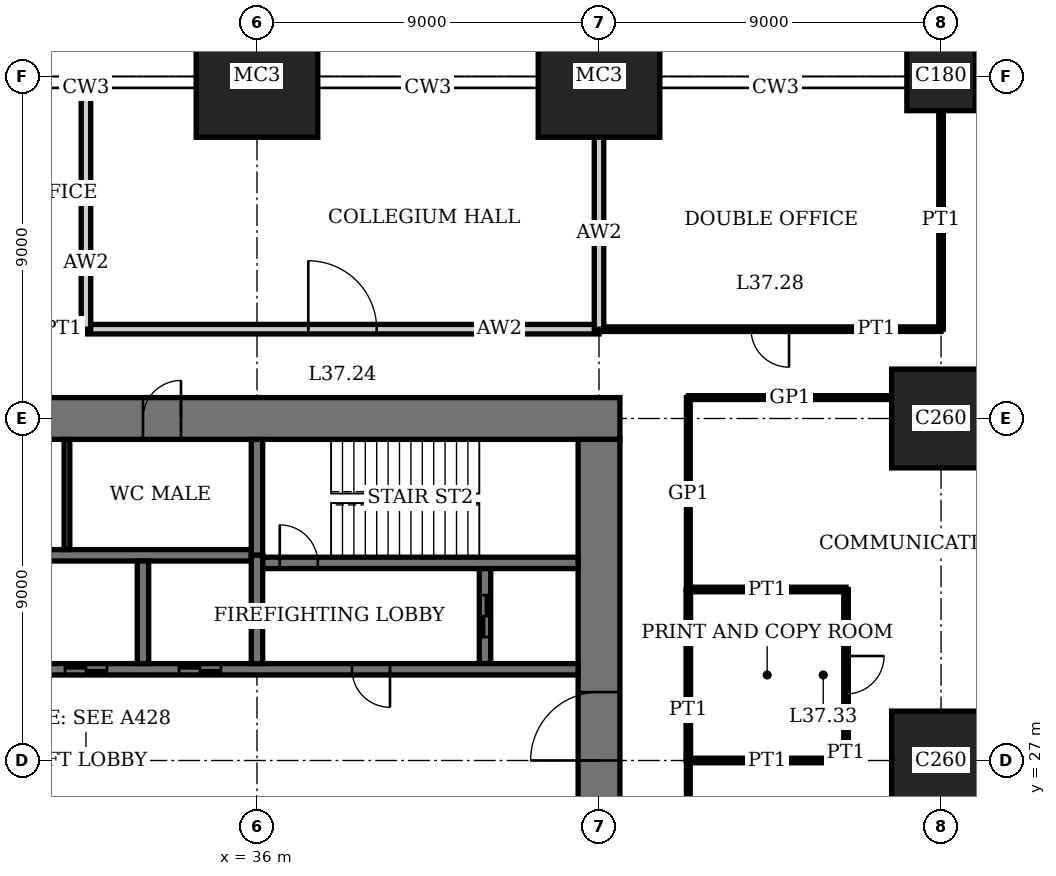
"""IFC4 building model, lengths in metres.
Left out: names, types, materials, properties, quantities, classifications, styles, units other than length and angle.
Written with IfcOpenShell. Run it as: python <this file> out.ifc"""

import sys

from ifc_helpers import new_model, si_unit, direction, frame, frame_2d, origin, origin_2d, place, context, subcontext, project, spatial, rectangle, extrude, element, fill, save


model = new_model("IFC4")
c1 = context("Model", 3, precision=1e-05, world=origin(), true_north=direction((0.0, 1.0)))
c2 = subcontext(c1, "Body", "Model", "MODEL_VIEW")
j1 = project(units=[si_unit("LENGTHUNIT", "METRE"), si_unit("PLANEANGLEUNIT", "RADIAN")], contexts=[c1])
p1 = place(None, origin())
s1 = spatial("IfcSite", under=j1, at=p1, CompositionType="ELEMENT")
p2 = place(p1, origin())
s2 = spatial("IfcBuilding", under=s1, at=p2, CompositionType="ELEMENT")
p3 = place(p2, frame((0.0, 0.0, 153.0)))
s3 = spatial("IfcBuildingStorey", under=s2, at=p3, CompositionType="ELEMENT", Elevation=153.0)
for number, where, z_axis, x_axis in (
    (1, (36.0, 45.0, 0.0), (0.0, 0.0, 1.0), (1.0, 0.0, 0.0)),
    (2, (45.0, 45.0, 0.0), (0.0, 0.0, 1.0), (1.0, 0.0, 0.0)),
):
    element("IfcColumn", number, at=place(p3, frame(where, z_axis=z_axis, x_axis=x_axis)), inside=s3, PredefinedType="COLUMN", context=c2, shape_type="SweptSolid", body=[
        extrude(rectangle(XDim=3.2, YDim=3.2, at=origin_2d()), origin(), (0.0, 0.0, 1.0), 4.2),
    ])
for number, where, z_axis, x_axis in (
    (3, (54.0, 27.0, 0.0), (0.0, 0.0, 1.0), (1.0, 0.0, 0.0)),
    (4, (54.0, 36.0, 0.0), (0.0, 0.0, 1.0), (1.0, 0.0, 0.0)),
):
    element("IfcColumn", number, at=place(p3, frame(where, z_axis=z_axis, x_axis=x_axis)), inside=s3, PredefinedType="COLUMN", context=c2, shape_type="SweptSolid", body=[
        extrude(rectangle(XDim=2.6, YDim=2.6, at=origin_2d()), origin(), (0.0, 0.0, 1.0), 4.2),
    ])
p4 = place(p3, frame((54.0, 45.0, 0.0), z_axis=(0.0, 0.0, 1.0), x_axis=(1.0, 0.0, 0.0)))
e5 = element("IfcColumn", 5, at=p4, inside=s3, PredefinedType="COLUMN", context=c2, shape_type="SweptSolid", body=[
    extrude(rectangle(XDim=1.8, YDim=1.8, at=origin_2d()), origin(), (0.0, 0.0, 1.0), 4.2),
])
p5 = place(p3, frame((45.55, 36.0, 0.0), z_axis=(0.0, 0.0, 1.0), x_axis=(-1.0, 0.0, 0.0)))
e6 = element("IfcWall", 6, at=p5, inside=s3, PredefinedType="SHEAR", context=c2, shape_type="SweptSolid", body=[
    extrude(rectangle(XDim=28.1, YDim=1.1, at=frame_2d((14.05, 0.0))), origin(), (0.0, 0.0, 1.0), 4.2),
])
p6 = place(p5, frame((11.55, 0.0, 0.0)))
e7 = element("IfcOpeningElement", 7, at=p6, cuts=e6, PredefinedType="OPENING", context=c2, shape_type="SweptSolid", body=[
    extrude(rectangle(XDim=1.0, YDim=2.4, at=frame_2d((0.5, 1.2))), frame((0.0, 0.56, 0.0), z_axis=(0.0, -1.0, 0.0), x_axis=(1.0, 0.0, 0.0)), (0.0, 0.0, 1.0), 1.12),
])
p7 = place(p5, frame((16.55, 0.0, 0.0)))
e8 = element("IfcOpeningElement", 8, at=p7, cuts=e6, PredefinedType="OPENING", context=c2, shape_type="SweptSolid", body=[
    extrude(rectangle(XDim=1.0, YDim=2.4, at=frame_2d((0.5, 1.2))), frame((0.0, 0.56, 0.0), z_axis=(0.0, -1.0, 0.0), x_axis=(1.0, 0.0, 0.0)), (0.0, 0.0, 1.0), 1.12),
])
p8 = place(p5, frame((20.0, 0.0, 0.0)))
e9 = element("IfcOpeningElement", 9, at=p8, cuts=e6, PredefinedType="OPENING", context=c2, shape_type="SweptSolid", body=[
    extrude(rectangle(XDim=1.1, YDim=2.4, at=frame_2d((0.55, 1.2))), frame((0.0, 0.56, 0.0), z_axis=(0.0, -1.0, 0.0), x_axis=(1.0, 0.0, 0.0)), (0.0, 0.0, 1.0), 1.12),
])
p9 = place(p5, frame((24.05, 0.0, 0.0)))
e10 = element("IfcOpeningElement", 10, at=p9, cuts=e6, PredefinedType="OPENING", context=c2, shape_type="SweptSolid", body=[
    extrude(rectangle(XDim=1.0, YDim=2.4, at=frame_2d((0.5, 1.2))), frame((0.0, 0.56, 0.0), z_axis=(0.0, -1.0, 0.0), x_axis=(1.0, 0.0, 0.0)), (0.0, 0.0, 1.0), 1.12),
])
p10 = place(p3, frame((45.0, 18.55, 0.0), z_axis=(0.0, 0.0, 1.0), x_axis=(0.0, 1.0, 0.0)))
e11 = element("IfcWall", 11, at=p10, inside=s3, PredefinedType="SHEAR", context=c2, shape_type="SweptSolid", body=[
    extrude(rectangle(XDim=16.9, YDim=1.1, at=frame_2d((8.45, 0.0))), origin(), (0.0, 0.0, 1.0), 4.2),
])
p11 = place(p10, frame((8.45, 0.0, 0.0)))
e12 = element("IfcOpeningElement", 12, at=p11, cuts=e11, PredefinedType="OPENING", context=c2, shape_type="SweptSolid", body=[
    extrude(rectangle(XDim=1.8, YDim=2.4, at=frame_2d((0.9, 1.2))), frame((0.0, 0.56, 0.0), z_axis=(0.0, -1.0, 0.0), x_axis=(1.0, 0.0, 0.0)), (0.0, 0.0, 1.0), 1.12),
])
p12 = place(p3, frame((36.15, 32.2, 0.0), z_axis=(0.0, 0.0, 1.0), x_axis=(1.0, 0.0, 0.0)))
e13 = element("IfcWall", 13, at=p12, inside=s3, PredefinedType="SHEAR", context=c2, shape_type="SweptSolid", body=[
    extrude(rectangle(XDim=8.3, YDim=0.3, at=frame_2d((4.15, 0.0))), origin(), (0.0, 0.0, 1.0), 4.2),
])
p13 = place(p12, frame((0.45, 0.0, 0.0)))
e14 = element("IfcOpeningElement", 14, at=p13, cuts=e13, PredefinedType="OPENING", context=c2, shape_type="SweptSolid", body=[
    extrude(rectangle(XDim=1.0, YDim=2.4, at=frame_2d((0.5, 1.2))), frame((0.0, 0.16, 0.0), z_axis=(0.0, -1.0, 0.0), x_axis=(1.0, 0.0, 0.0)), (0.0, 0.0, 1.0), 0.32),
])
p14 = place(p3, frame((36.0, 32.4, 0.0), z_axis=(0.0, 0.0, 1.0), x_axis=(0.0, 1.0, 0.0)))
e15 = element("IfcWall", 15, at=p14, inside=s3, PredefinedType="SHEAR", context=c2, shape_type="SweptSolid", body=[
    extrude(rectangle(XDim=3.05, YDim=0.3, at=frame_2d((1.525, 0.0))), origin(), (0.0, 0.0, 1.0), 4.2),
])
p15 = place(p3, frame((42.0, 29.55, 0.0), z_axis=(0.0, 0.0, 1.0), x_axis=(0.0, 1.0, 0.0)))
e16 = element("IfcWall", 16, at=p15, inside=s3, PredefinedType="SHEAR", context=c2, shape_type="SweptSolid", body=[
    extrude(rectangle(XDim=2.5, YDim=0.3, at=frame_2d((1.25, 0.0))), origin(), (0.0, 0.0, 1.0), 4.2),
])
p16 = place(p15, frame((0.7, 0.0, 0.0)))
e17 = element("IfcOpeningElement", 17, at=p16, cuts=e16, PredefinedType="OPENING", context=c2, shape_type="SweptSolid", body=[
    extrude(rectangle(XDim=1.1, YDim=2.4, at=frame_2d((0.55, 1.2))), frame((0.0, 0.16, 0.0), z_axis=(0.0, -1.0, 0.0), x_axis=(1.0, 0.0, 0.0)), (0.0, 0.0, 1.0), 0.32),
])
p17 = place(p3, frame((18.55, 29.4, 0.0), z_axis=(0.0, 0.0, 1.0), x_axis=(1.0, 0.0, 0.0)))
e18 = element("IfcWall", 18, at=p17, inside=s3, PredefinedType="SHEAR", context=c2, shape_type="SweptSolid", body=[
    extrude(rectangle(XDim=25.9, YDim=0.3, at=frame_2d((12.95, 0.0))), origin(), (0.0, 0.0, 1.0), 4.2),
])
p18 = place(p17, frame((19.95, 0.0, 0.0)))
e19 = element("IfcOpeningElement", 19, at=p18, cuts=e18, PredefinedType="OPENING", context=c2, shape_type="SweptSolid", body=[
    extrude(rectangle(XDim=1.0, YDim=2.4, at=frame_2d((0.5, 1.2))), frame((0.0, 0.16, 0.0), z_axis=(0.0, -1.0, 0.0), x_axis=(1.0, 0.0, 0.0)), (0.0, 0.0, 1.0), 0.32),
])
p19 = place(p17, frame((0.5, 0.0, 0.0)))
e20 = element("IfcOpeningElement", 20, at=p19, cuts=e18, PredefinedType="OPENING", context=c2, shape_type="SweptSolid", body=[
    extrude(rectangle(XDim=0.9, YDim=2.1, at=frame_2d((0.45, 1.05))), frame((0.0, 0.16, 0.0), z_axis=(0.0, -1.0, 0.0), x_axis=(1.0, 0.0, 0.0)), (0.0, 0.0, 1.0), 0.32),
])
p20 = place(p17, frame((15.4, 0.0, 0.0)))
e21 = element("IfcOpeningElement", 21, at=p20, cuts=e18, PredefinedType="OPENING", context=c2, shape_type="SweptSolid", body=[
    extrude(rectangle(XDim=1.1, YDim=2.4, at=frame_2d((0.55, 1.2))), frame((0.0, 0.16, 0.0), z_axis=(0.0, -1.0, 0.0), x_axis=(1.0, 0.0, 0.0)), (0.0, 0.0, 1.0), 0.32),
])
p21 = place(p17, frame((12.4, 0.0, 0.0)))
e22 = element("IfcOpeningElement", 22, at=p21, cuts=e18, PredefinedType="OPENING", context=c2, shape_type="SweptSolid", body=[
    extrude(rectangle(XDim=1.1, YDim=2.4, at=frame_2d((0.55, 1.2))), frame((0.0, 0.16, 0.0), z_axis=(0.0, -1.0, 0.0), x_axis=(1.0, 0.0, 0.0)), (0.0, 0.0, 1.0), 0.32),
])
p22 = place(p17, frame((3.3, 0.0, 0.0)))
e23 = element("IfcOpeningElement", 23, at=p22, cuts=e18, PredefinedType="OPENING", context=c2, shape_type="SweptSolid", body=[
    extrude(rectangle(XDim=1.3, YDim=2.4, at=frame_2d((0.65, 1.2))), frame((0.0, 0.16, 0.0), z_axis=(0.0, -1.0, 0.0), x_axis=(1.0, 0.0, 0.0)), (0.0, 0.0, 1.0), 0.32),
])
p23 = place(p3, frame((18.55, 32.4, 0.0), z_axis=(0.0, 0.0, 1.0), x_axis=(1.0, 0.0, 0.0)))
e24 = element("IfcWall", 24, at=p23, inside=s3, PredefinedType="SHEAR", context=c2, shape_type="SweptSolid", body=[
    extrude(rectangle(XDim=17.3, YDim=0.3, at=frame_2d((8.65, 0.0))), origin(), (0.0, 0.0, 1.0), 4.2),
])
p24 = place(p3, frame((33.0, 29.55, 0.0), z_axis=(0.0, 0.0, 1.0), x_axis=(0.0, 1.0, 0.0)))
e25 = element("IfcWall", 25, at=p24, inside=s3, PredefinedType="SHEAR", context=c2, shape_type="SweptSolid", body=[
    extrude(rectangle(XDim=2.7, YDim=0.3, at=frame_2d((1.35, 0.0))), origin(), (0.0, 0.0, 1.0), 4.2),
])
p25 = place(p3, frame((36.0, 29.55, 0.0), z_axis=(0.0, 0.0, 1.0), x_axis=(0.0, 1.0, 0.0)))
e26 = element("IfcWall", 26, at=p25, inside=s3, PredefinedType="SHEAR", context=c2, shape_type="SweptSolid", body=[
    extrude(rectangle(XDim=2.85, YDim=0.3, at=frame_2d((1.425, 0.0))), origin(), (0.0, 0.0, 1.0), 4.2),
])
p26 = place(p3, frame((47.35, 27.0, 0.0), z_axis=(0.0, 0.0, 1.0), x_axis=(1.0, 0.0, 0.0)))
e27 = element("IfcWall", 27, at=p26, inside=s3, PredefinedType="PARTITIONING", context=c2, shape_type="SweptSolid", body=[
    extrude(rectangle(XDim=4.15, YDim=0.12, at=frame_2d((2.075, 0.0))), origin(), (0.0, 0.0, 1.0), 3.25),
])
p27 = place(p3, frame((47.35, 31.5, 0.0), z_axis=(0.0, 0.0, 1.0), x_axis=(1.0, 0.0, 0.0)))
e28 = element("IfcWall", 28, at=p27, inside=s3, PredefinedType="PARTITIONING", context=c2, shape_type="SweptSolid", body=[
    extrude(rectangle(XDim=4.15, YDim=0.12, at=frame_2d((2.075, 0.0))), origin(), (0.0, 0.0, 1.0), 3.15),
])
p28 = place(p3, frame((47.35, 36.55, 0.0), z_axis=(0.0, 0.0, 1.0), x_axis=(1.0, 0.0, 0.0)))
e29 = element("IfcWall", 29, at=p28, inside=s3, PredefinedType="PARTITIONING", context=c2, shape_type="SweptSolid", body=[
    extrude(rectangle(XDim=5.35, YDim=0.1, at=frame_2d((2.675, 0.0))), origin(), (0.0, 0.0, 1.0), 3.85),
])
p29 = place(p3, frame((31.5, 38.35, 0.0), z_axis=(0.0, 0.0, 1.0), x_axis=(1.0, 0.0, 0.0)))
e30 = element("IfcWall", 30, at=p29, inside=s3, PredefinedType="PARTITIONING", context=c2, shape_type="SweptSolid", body=[
    extrude(rectangle(XDim=13.5, YDim=0.25, at=frame_2d((6.75, 0.0))), origin(), (0.0, 0.0, 1.0), 3.85),
])
p30 = place(p29, frame((5.85, 0.0, 0.0)))
e31 = element("IfcOpeningElement", 31, at=p30, cuts=e30, PredefinedType="OPENING", context=c2, shape_type="SweptSolid", body=[
    extrude(rectangle(XDim=1.8, YDim=2.4, at=frame_2d((0.9, 1.2))), frame((0.0, 0.135, 0.0), z_axis=(0.0, -1.0, 0.0), x_axis=(1.0, 0.0, 0.0)), (0.0, 0.0, 1.0), 0.27),
])
p31 = place(p3, frame((27.0, 38.35, 0.0), z_axis=(0.0, 0.0, 1.0), x_axis=(1.0, 0.0, 0.0)))
e32 = element("IfcWall", 32, at=p31, inside=s3, PredefinedType="PARTITIONING", context=c2, shape_type="SweptSolid", body=[
    extrude(rectangle(XDim=4.5, YDim=0.12, at=frame_2d((2.25, 0.0))), origin(), (0.0, 0.0, 1.0), 3.85),
])
p32 = place(p31, frame((1.75, 0.0, 0.0)))
e33 = element("IfcOpeningElement", 33, at=p32, cuts=e32, PredefinedType="OPENING", context=c2, shape_type="SweptSolid", body=[
    extrude(rectangle(XDim=1.0, YDim=2.4, at=frame_2d((0.5, 1.2))), frame((0.0, 0.07, 0.0), z_axis=(0.0, -1.0, 0.0), x_axis=(1.0, 0.0, 0.0)), (0.0, 0.0, 1.0), 0.14),
])
p33 = place(p3, frame((45.0, 38.35, 0.0), z_axis=(0.0, 0.0, 1.0), x_axis=(1.0, 0.0, 0.0)))
e34 = element("IfcWall", 34, at=p33, inside=s3, PredefinedType="PARTITIONING", context=c2, shape_type="SweptSolid", body=[
    extrude(rectangle(XDim=9.0, YDim=0.12, at=frame_2d((4.5, 0.0))), origin(), (0.0, 0.0, 1.0), 3.85),
])
p34 = place(p33, frame((4.0, 0.0, 0.0)))
e35 = element("IfcOpeningElement", 35, at=p34, cuts=e34, PredefinedType="OPENING", context=c2, shape_type="SweptSolid", body=[
    extrude(rectangle(XDim=1.0, YDim=2.4, at=frame_2d((0.5, 1.2))), frame((0.0, 0.07, 0.0), z_axis=(0.0, -1.0, 0.0), x_axis=(1.0, 0.0, 0.0)), (0.0, 0.0, 1.0), 0.14),
])
p35 = place(p3, frame((31.5, 38.35, 0.0), z_axis=(0.0, 0.0, 1.0), x_axis=(0.0, 1.0, 0.0)))
e36 = element("IfcWall", 36, at=p35, inside=s3, PredefinedType="PARTITIONING", context=c2, shape_type="SweptSolid", body=[
    extrude(rectangle(XDim=6.34, YDim=0.25, at=frame_2d((3.17, 0.0))), origin(), (0.0, 0.0, 1.0), 3.85),
])
p36 = place(p3, frame((45.0, 38.35, 0.0), z_axis=(0.0, 0.0, 1.0), x_axis=(0.0, 1.0, 0.0)))
e37 = element("IfcWall", 37, at=p36, inside=s3, PredefinedType="PARTITIONING", context=c2, shape_type="SweptSolid", body=[
    extrude(rectangle(XDim=5.05, YDim=0.25, at=frame_2d((2.525, 0.0))), origin(), (0.0, 0.0, 1.0), 3.25),
])
p37 = place(p3, frame((47.35, 27.0, 0.0), z_axis=(0.0, 0.0, 1.0), x_axis=(0.0, 1.0, 0.0)))
e38 = element("IfcWall", 38, at=p37, inside=s3, PredefinedType="PARTITIONING", context=c2, shape_type="SweptSolid", body=[
    extrude(rectangle(XDim=4.5, YDim=0.12, at=frame_2d((2.25, 0.0))), origin(), (0.0, 0.0, 1.0), 3.85),
])
p38 = place(p3, frame((47.35, 15.65, 0.0), z_axis=(0.0, 0.0, 1.0), x_axis=(0.0, 1.0, 0.0)))
e39 = element("IfcWall", 39, at=p38, inside=s3, PredefinedType="PARTITIONING", context=c2, shape_type="SweptSolid", body=[
    extrude(rectangle(XDim=11.35, YDim=0.1, at=frame_2d((5.675, 0.0))), origin(), (0.0, 0.0, 1.0), 3.85),
])
p39 = place(p38, frame((5.175, 0.0, 0.0)))
e40 = element("IfcOpeningElement", 40, at=p39, cuts=e39, PredefinedType="OPENING", context=c2, shape_type="SweptSolid", body=[
    extrude(rectangle(XDim=1.0, YDim=2.4, at=frame_2d((0.5, 1.2))), frame((0.0, 0.06, 0.0), z_axis=(0.0, -1.0, 0.0), x_axis=(1.0, 0.0, 0.0)), (0.0, 0.0, 1.0), 0.12),
])
p40 = place(p3, frame((47.35, 31.5, 0.0), z_axis=(0.0, 0.0, 1.0), x_axis=(0.0, 1.0, 0.0)))
e41 = element("IfcWall", 41, at=p40, inside=s3, PredefinedType="PARTITIONING", context=c2, shape_type="SweptSolid", body=[
    extrude(rectangle(XDim=5.05, YDim=0.1, at=frame_2d((2.525, 0.0))), origin(), (0.0, 0.0, 1.0), 3.85),
])
p41 = place(p3, frame((51.5, 27.0, 0.0), z_axis=(0.0, 0.0, 1.0), x_axis=(0.0, 1.0, 0.0)))
e42 = element("IfcWall", 42, at=p41, inside=s3, PredefinedType="PARTITIONING", context=c2, shape_type="SweptSolid", body=[
    extrude(rectangle(XDim=4.5, YDim=0.12, at=frame_2d((2.25, 0.0))), origin(), (0.0, 0.0, 1.0), 3.85),
])
p42 = place(p41, frame((1.75, 0.0, 0.0)))
e43 = element("IfcOpeningElement", 43, at=p42, cuts=e42, PredefinedType="OPENING", context=c2, shape_type="SweptSolid", body=[
    extrude(rectangle(XDim=1.0, YDim=2.4, at=frame_2d((0.5, 1.2))), frame((0.0, 0.07, 0.0), z_axis=(0.0, -1.0, 0.0), x_axis=(1.0, 0.0, 0.0)), (0.0, 0.0, 1.0), 0.14),
])
p43 = place(p3, frame((54.0, 38.35, 0.0), z_axis=(0.0, 0.0, 1.0), x_axis=(0.0, 1.0, 0.0)))
e44 = element("IfcWall", 44, at=p43, inside=s3, PredefinedType="PARTITIONING", context=c2, shape_type="SweptSolid", body=[
    extrude(rectangle(XDim=5.75, YDim=0.12, at=frame_2d((2.875, 0.0))), origin(), (0.0, 0.0, 1.0), 3.05),
])
p44 = place(p3, frame((31.0, 32.55, 0.0), z_axis=(0.0, 0.0, 1.0), x_axis=(0.0, 1.0, 0.0)))
e45 = element("IfcWall", 45, at=p44, inside=s3, PredefinedType="PARTITIONING", context=c2, shape_type="SweptSolid", body=[
    extrude(rectangle(XDim=2.9, YDim=0.15, at=frame_2d((1.45, 0.0))), origin(), (0.0, 0.0, 1.0), 3.85),
])
p45 = place(p11, origin())
e46 = element("IfcDoor", 46, at=p45, inside=s3, OperationType="DOUBLE_DOOR_DOUBLE_SWING", PredefinedType="DOOR", context=c2, shape_type="SweptSolid", body=[
    extrude(rectangle(XDim=1.8, YDim=2.4, at=frame_2d((0.9, 1.2))), frame((0.0, 0.03, 0.0), z_axis=(0.0, -1.0, 0.0), x_axis=(1.0, 0.0, 0.0)), (0.0, 0.0, 1.0), 0.06),
    extrude(rectangle(XDim=0.04, YDim=2.4, at=frame_2d((0.02, 1.2))), frame((0.0, 0.55, 0.0), z_axis=(0.0, -1.0, 0.0), x_axis=(1.0, 0.0, 0.0)), (0.0, 0.0, 1.0), 1.1),
    extrude(rectangle(XDim=0.04, YDim=2.4, at=frame_2d((1.78, 1.2))), frame((0.0, 0.55, 0.0), z_axis=(0.0, -1.0, 0.0), x_axis=(1.0, 0.0, 0.0)), (0.0, 0.0, 1.0), 1.1),
    extrude(rectangle(XDim=1.8, YDim=0.04, at=frame_2d((0.9, 2.38))), frame((0.0, 0.55, 0.0), z_axis=(0.0, -1.0, 0.0), x_axis=(1.0, 0.0, 0.0)), (0.0, 0.0, 1.0), 1.1),
])
fill(e12, e46)
p46 = place(p6, origin())
e47 = element("IfcDoor", 47, at=p46, inside=s3, OperationType="SINGLE_SWING_LEFT", PredefinedType="DOOR", context=c2, shape_type="SweptSolid", body=[
    extrude(rectangle(XDim=1.0, YDim=2.4, at=frame_2d((0.5, 1.2))), frame((0.0, 0.025, 0.0), z_axis=(0.0, -1.0, 0.0), x_axis=(1.0, 0.0, 0.0)), (0.0, 0.0, 1.0), 0.05),
    extrude(rectangle(XDim=0.04, YDim=2.4, at=frame_2d((0.02, 1.2))), frame((0.0, 0.4, 0.0), z_axis=(0.0, -1.0, 0.0), x_axis=(1.0, 0.0, 0.0)), (0.0, 0.0, 1.0), 0.8),
    extrude(rectangle(XDim=0.04, YDim=2.4, at=frame_2d((0.98, 1.2))), frame((0.0, 0.4, 0.0), z_axis=(0.0, -1.0, 0.0), x_axis=(1.0, 0.0, 0.0)), (0.0, 0.0, 1.0), 0.8),
    extrude(rectangle(XDim=1.0, YDim=0.04, at=frame_2d((0.5, 2.38))), frame((0.0, 0.4, 0.0), z_axis=(0.0, -1.0, 0.0), x_axis=(1.0, 0.0, 0.0)), (0.0, 0.0, 1.0), 0.8),
])
fill(e7, e47)
p47 = place(p13, origin())
e48 = element("IfcDoor", 48, at=p47, inside=s3, OperationType="SINGLE_SWING_RIGHT", PredefinedType="DOOR", context=c2, shape_type="SweptSolid", body=[
    extrude(rectangle(XDim=1.0, YDim=2.4, at=frame_2d((0.5, 1.2))), frame((0.0, 0.03, 0.0), z_axis=(0.0, -1.0, 0.0), x_axis=(1.0, 0.0, 0.0)), (0.0, 0.0, 1.0), 0.06),
])
fill(e14, e48)
p48 = place(p18, origin())
e49 = element("IfcDoor", 49, at=p48, inside=s3, OperationType="SINGLE_SWING_RIGHT", PredefinedType="DOOR", context=c2, shape_type="SweptSolid", body=[
    extrude(rectangle(XDim=1.0, YDim=2.4, at=frame_2d((0.5, 1.2))), frame((0.0, 0.03, 0.0), z_axis=(0.0, -1.0, 0.0), x_axis=(1.0, 0.0, 0.0)), (0.0, 0.0, 1.0), 0.06),
])
fill(e19, e49)
p49 = place(p30, origin())
e50 = element("IfcDoor", 50, at=p49, inside=s3, OperationType="DOUBLE_DOOR_SINGLE_SWING", PredefinedType="DOOR", context=c2, shape_type="SweptSolid", body=[
    extrude(rectangle(XDim=1.8, YDim=2.4, at=frame_2d((0.9, 1.2))), frame((0.0, 0.025, 0.0), z_axis=(0.0, -1.0, 0.0), x_axis=(1.0, 0.0, 0.0)), (0.0, 0.0, 1.0), 0.05),
])
fill(e31, e50)
p50 = place(p34, origin())
e51 = element("IfcDoor", 51, at=p50, inside=s3, OperationType="SINGLE_SWING_RIGHT", PredefinedType="DOOR", context=c2, shape_type="SweptSolid", body=[
    extrude(rectangle(XDim=1.0, YDim=2.4, at=frame_2d((0.5, 1.2))), frame((0.0, 0.025, 0.0), z_axis=(0.0, -1.0, 0.0), x_axis=(1.0, 0.0, 0.0)), (0.0, 0.0, 1.0), 0.05),
])
fill(e35, e51)
p51 = place(p42, origin())
e52 = element("IfcDoor", 52, at=p51, inside=s3, OperationType="SINGLE_SWING_RIGHT", PredefinedType="DOOR", context=c2, shape_type="SweptSolid", body=[
    extrude(rectangle(XDim=1.0, YDim=2.4, at=frame_2d((0.5, 1.2))), frame((0.0, 0.025, 0.0), z_axis=(0.0, -1.0, 0.0), x_axis=(1.0, 0.0, 0.0)), (0.0, 0.0, 1.0), 0.05),
])
fill(e43, e52)
p52 = place(p20, origin())
e53 = element("IfcDoor", 53, at=p52, inside=s3, OperationType="DOUBLE_DOOR_SLIDING", PredefinedType="DOOR", context=c2, shape_type="SweptSolid", body=[
    extrude(rectangle(XDim=1.1, YDim=2.4, at=frame_2d((0.55, 1.2))), frame((0.0, 0.02, 0.0), z_axis=(0.0, -1.0, 0.0), x_axis=(1.0, 0.0, 0.0)), (0.0, 0.0, 1.0), 0.04),
])
fill(e21, e53)
p53 = place(p21, origin())
e54 = element("IfcDoor", 54, at=p53, inside=s3, OperationType="DOUBLE_DOOR_SLIDING", PredefinedType="DOOR", context=c2, shape_type="SweptSolid", body=[
    extrude(rectangle(XDim=1.1, YDim=2.4, at=frame_2d((0.55, 1.2))), frame((0.0, 0.02, 0.0), z_axis=(0.0, -1.0, 0.0), x_axis=(1.0, 0.0, 0.0)), (0.0, 0.0, 1.0), 0.04),
])
fill(e22, e54)
p54 = place(p16, origin())
e55 = element("IfcDoor", 55, at=p54, inside=s3, OperationType="DOUBLE_DOOR_SLIDING", PredefinedType="DOOR", context=c2, shape_type="SweptSolid", body=[
    extrude(rectangle(XDim=1.1, YDim=2.4, at=frame_2d((0.55, 1.2))), frame((0.0, 0.03, 0.0), z_axis=(0.0, -1.0, 0.0), x_axis=(1.0, 0.0, 0.0)), (0.0, 0.0, 1.0), 0.06),
])
fill(e17, e55)
save(model, sys.argv[1])
